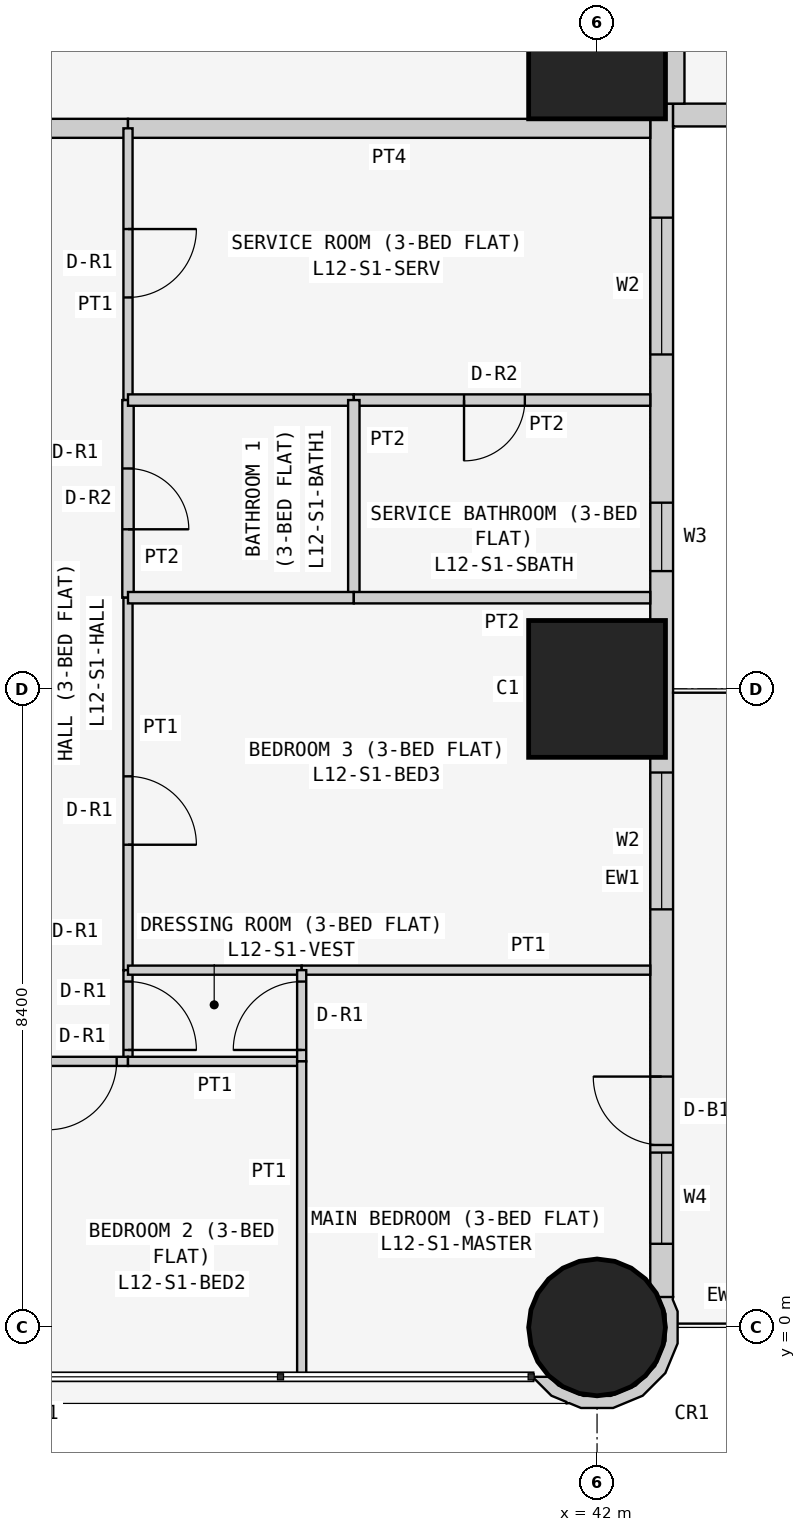
"""IFC4 building model, lengths in metres.
Left out: names, types, materials, properties, quantities, classifications, styles, units other than length and angle.
Written with IfcOpenShell. Run it as: python <this file> out.ifc"""

import sys

from ifc_helpers import new_model, si_unit, direction, frame, frame_2d, origin, origin_2d, place, context, subcontext, project, spatial, polyline, rectangle, circle, outline, extrude, element, fill, save


model = new_model("IFC4")
c1 = context("Model", 3, precision=1e-05, world=origin(), true_north=direction((0.0, 1.0)))
c2 = subcontext(c1, "Body", "Model", "MODEL_VIEW")
j1 = project(units=[si_unit("LENGTHUNIT", "METRE"), si_unit("PLANEANGLEUNIT", "RADIAN")], contexts=[c1])
p1 = place(None, origin())
s1 = spatial("IfcSite", under=j1, at=p1, CompositionType="ELEMENT")
p2 = place(p1, origin())
s2 = spatial("IfcBuilding", under=s1, at=p2, CompositionType="ELEMENT")
p3 = place(p2, frame((0.0, 0.0, 52.5)))
s3 = spatial("IfcBuildingStorey", under=s2, at=p3, CompositionType="ELEMENT", Elevation=52.5)
p4 = place(p3, frame((42.0, 0.0, 0.0), z_axis=(0.0, 0.0, 1.0), x_axis=(1.0, 0.0, 0.0)))
e1 = element("IfcColumn", 1, at=p4, inside=s3, PredefinedType="COLUMN", context=c2, shape_type="SweptSolid", body=[
    extrude(circle(Radius=0.9, at=origin_2d()), origin(), (0.0, 0.0, 1.0), 3.6),
])
for number, where, z_axis, x_axis in (
    (2, (42.0, 8.4, 0.0), (0.0, 0.0, 1.0), (1.0, 0.0, 0.0)),
    (3, (42.0, 16.8, 0.0), (0.0, 0.0, 1.0), (1.0, 0.0, 0.0)),
):
    element("IfcColumn", number, at=place(p3, frame(where, z_axis=z_axis, x_axis=x_axis)), inside=s3, PredefinedType="COLUMN", context=c2, shape_type="SweptSolid", body=[
        extrude(rectangle(XDim=1.8, YDim=1.8, at=origin_2d()), origin(), (0.0, 0.0, 1.0), 3.6),
    ])
p5 = place(p3, frame((42.85, 0.4, 0.0), z_axis=(0.0, 0.0, 1.0), x_axis=(0.0, 1.0, 0.0)))
e4 = element("IfcWall", 4, at=p5, inside=s3, PredefinedType="SOLIDWALL", context=c2, shape_type="SweptSolid", body=[
    extrude(rectangle(XDim=15.7, YDim=0.3, at=frame_2d((7.85, 0.0))), origin(), (0.0, 0.0, 1.0), 3.45),
])
p6 = place(p5, frame((12.4, 0.0, 0.9)))
e5 = element("IfcOpeningElement", 5, at=p6, cuts=e4, PredefinedType="OPENING", context=c2, shape_type="SweptSolid", body=[
    extrude(rectangle(XDim=1.8, YDim=1.5, at=frame_2d((0.9, 0.75))), frame((0.0, 0.16, 0.0), z_axis=(0.0, -1.0, 0.0), x_axis=(1.0, 0.0, 0.0)), (0.0, 0.0, 1.0), 0.32),
])
p7 = place(p5, frame((9.55, 0.0, 1.5)))
e6 = element("IfcOpeningElement", 6, at=p7, cuts=e4, PredefinedType="OPENING", context=c2, shape_type="SweptSolid", body=[
    extrude(rectangle(XDim=0.9, YDim=0.7, at=frame_2d((0.45, 0.35))), frame((0.0, 0.16, 0.0), z_axis=(0.0, -1.0, 0.0), x_axis=(1.0, 0.0, 0.0)), (0.0, 0.0, 1.0), 0.32),
])
p8 = place(p5, frame((5.1, 0.0, 0.9)))
e7 = element("IfcOpeningElement", 7, at=p8, cuts=e4, PredefinedType="OPENING", context=c2, shape_type="SweptSolid", body=[
    extrude(rectangle(XDim=1.8, YDim=1.5, at=frame_2d((0.9, 0.75))), frame((0.0, 0.16, 0.0), z_axis=(0.0, -1.0, 0.0), x_axis=(1.0, 0.0, 0.0)), (0.0, 0.0, 1.0), 0.32),
])
p9 = place(p5, frame((2.0, 0.0, 0.0)))
e8 = element("IfcOpeningElement", 8, at=p9, cuts=e4, PredefinedType="OPENING", context=c2, shape_type="SweptSolid", body=[
    extrude(rectangle(XDim=0.9, YDim=2.4, at=frame_2d((0.45, 1.2))), frame((0.0, 0.16, 0.0), z_axis=(0.0, -1.0, 0.0), x_axis=(1.0, 0.0, 0.0)), (0.0, 0.0, 1.0), 0.32),
])
p10 = place(p5, frame((0.7, 0.0, 0.9)))
e9 = element("IfcOpeningElement", 9, at=p10, cuts=e4, PredefinedType="OPENING", context=c2, shape_type="SweptSolid", body=[
    extrude(rectangle(XDim=1.2, YDim=1.5, at=frame_2d((0.6, 0.75))), frame((0.0, 0.16, 0.0), z_axis=(0.0, -1.0, 0.0), x_axis=(1.0, 0.0, 0.0)), (0.0, 0.0, 1.0), 0.32),
])
p11 = place(p3, frame((43.0, 15.95, 0.0), z_axis=(0.0, 0.0, 1.0), x_axis=(1.0, 0.0, 0.0)))
e10 = element("IfcWall", 10, at=p11, inside=s3, PredefinedType="SOLIDWALL", context=c2, shape_type="SweptSolid", body=[
    extrude(rectangle(XDim=15.4, YDim=0.3, at=frame_2d((7.7, 0.0))), origin(), (0.0, 0.0, 1.0), 3.45),
])
p12 = place(p11, frame((1.2, 0.0, 0.9)))
e11 = element("IfcOpeningElement", 11, at=p12, cuts=e10, PredefinedType="OPENING", context=c2, shape_type="SweptSolid", body=[
    extrude(rectangle(XDim=1.8, YDim=1.5, at=frame_2d((0.9, 0.75))), frame((0.0, 0.16, 0.0), z_axis=(0.0, -1.0, 0.0), x_axis=(1.0, 0.0, 0.0)), (0.0, 0.0, 1.0), 0.32),
])
p13 = place(p11, frame((4.95, 0.0, 1.5)))
e12 = element("IfcOpeningElement", 12, at=p13, cuts=e10, PredefinedType="OPENING", context=c2, shape_type="SweptSolid", body=[
    extrude(rectangle(XDim=0.9, YDim=0.7, at=frame_2d((0.45, 0.35))), frame((0.0, 0.16, 0.0), z_axis=(0.0, -1.0, 0.0), x_axis=(1.0, 0.0, 0.0)), (0.0, 0.0, 1.0), 0.32),
])
p14 = place(p11, frame((8.5, 0.0, 0.9)))
e13 = element("IfcOpeningElement", 13, at=p14, cuts=e10, PredefinedType="OPENING", context=c2, shape_type="SweptSolid", body=[
    extrude(rectangle(XDim=1.8, YDim=1.5, at=frame_2d((0.9, 0.75))), frame((0.0, 0.16, 0.0), z_axis=(0.0, -1.0, 0.0), x_axis=(1.0, 0.0, 0.0)), (0.0, 0.0, 1.0), 0.32),
])
p15 = place(p11, frame((12.5, 0.0, 0.0)))
e14 = element("IfcOpeningElement", 14, at=p15, cuts=e10, PredefinedType="OPENING", context=c2, shape_type="SweptSolid", body=[
    extrude(rectangle(XDim=0.9, YDim=2.4, at=frame_2d((0.45, 1.2))), frame((0.0, 0.16, 0.0), z_axis=(0.0, -1.0, 0.0), x_axis=(1.0, 0.0, 0.0)), (0.0, 0.0, 1.0), 0.32),
])
p16 = place(p11, frame((13.5, 0.0, 0.9)))
e15 = element("IfcOpeningElement", 15, at=p16, cuts=e10, PredefinedType="OPENING", context=c2, shape_type="SweptSolid", body=[
    extrude(rectangle(XDim=1.2, YDim=1.5, at=frame_2d((0.6, 0.75))), frame((0.0, 0.16, 0.0), z_axis=(0.0, -1.0, 0.0), x_axis=(1.0, 0.0, 0.0)), (0.0, 0.0, 1.0), 0.32),
])
p17 = place(p3, frame((41.233, -0.611, 0.0), z_axis=(0.0, 0.0, 1.0), x_axis=(0.377204953059, -0.926129809145, 0.0)))
e16 = element("IfcWall", 16, at=p17, inside=s3, PredefinedType="SOLIDWALL", context=c2, shape_type="SweptSolid", body=[
    extrude(outline(polyline([(0.319, 1.843), (-0.072, 2.001), (-0.24, 2.001), (-0.269, 2.017), (-0.37, 1.841), (-0.102, 1.842), (0.23, 1.707), (0.485, 1.455), (0.624, 1.125), (0.626, 0.766), (0.49, 0.434), (0.239, 0.179), (0.09, 0.117), (0.011, -0.078), (0.024, -0.083), (0.33, 0.045), (0.48, 0.197), (0.499, 0.193), (0.508, 0.225), (0.626, 0.345), (0.785, 0.736), (0.782, 1.157), (0.619, 1.546), (0.319, 1.843)])), origin(), (0.0, 0.0, 1.0), 3.45),
])
p18 = place(p3, frame((43.025, 22.571, 0.0), z_axis=(0.0, 0.0, 1.0), x_axis=(0.0, -1.0, 0.0)))
e17 = element("IfcWall", 17, at=p18, inside=s3, PredefinedType="PARTITIONING", context=c2, shape_type="SweptSolid", body=[
    extrude(rectangle(XDim=6.471, YDim=0.25, at=frame_2d((3.235, 0.0))), origin(), (0.0, 0.0, 1.0), 3.45),
])
p19 = place(p3, frame((35.829, 15.775, 0.0), z_axis=(0.0, 0.0, 1.0), x_axis=(-1.0, 0.0, 0.0)))
e18 = element("IfcWall", 18, at=p19, inside=s3, PredefinedType="PARTITIONING", context=c2, shape_type="SweptSolid", body=[
    extrude(rectangle(XDim=1.2, YDim=0.25, at=frame_2d((0.6, 0.0))), origin(), (0.0, 0.0, 1.0), 3.45),
])
p20 = place(p3, frame((42.7, 15.775, 0.0), z_axis=(0.0, 0.0, 1.0), x_axis=(-1.0, 0.0, 0.0)))
e19 = element("IfcWall", 19, at=p20, inside=s3, PredefinedType="PARTITIONING", context=c2, shape_type="SweptSolid", body=[
    extrude(rectangle(XDim=6.871, YDim=0.25, at=frame_2d((3.436, 0.0))), origin(), (0.0, 0.0, 1.0), 3.45),
])
p21 = place(p3, frame((35.829, 12.2, 0.0), z_axis=(0.0, 0.0, 1.0), x_axis=(0.0, 1.0, 0.0)))
e20 = element("IfcWall", 20, at=p21, inside=s3, PredefinedType="PARTITIONING", context=c2, shape_type="SweptSolid", body=[
    extrude(rectangle(XDim=3.575, YDim=0.12, at=frame_2d((1.788, 0.0))), origin(), (0.0, 0.0, 1.0), 3.45),
])
p22 = place(p21, frame((1.35, 0.0, 0.0)))
e21 = element("IfcOpeningElement", 21, at=p22, cuts=e20, PredefinedType="OPENING", context=c2, shape_type="SweptSolid", body=[
    extrude(rectangle(XDim=0.9, YDim=2.1, at=frame_2d((0.45, 1.05))), frame((0.0, 0.07, 0.0), z_axis=(0.0, -1.0, 0.0), x_axis=(1.0, 0.0, 0.0)), (0.0, 0.0, 1.0), 0.14),
])
p23 = place(p3, frame((35.829, 9.6, 0.0), z_axis=(0.0, 0.0, 1.0), x_axis=(0.0, 1.0, 0.0)))
e22 = element("IfcWall", 22, at=p23, inside=s3, PredefinedType="PARTITIONING", context=c2, shape_type="SweptSolid", body=[
    extrude(rectangle(XDim=2.6, YDim=0.15, at=frame_2d((1.3, 0.0))), origin(), (0.0, 0.0, 1.0), 3.45),
])
p24 = place(p23, frame((0.9, 0.0, 0.0)))
e23 = element("IfcOpeningElement", 23, at=p24, cuts=e22, PredefinedType="OPENING", context=c2, shape_type="SweptSolid", body=[
    extrude(rectangle(XDim=0.8, YDim=2.1, at=frame_2d((0.4, 1.05))), frame((0.0, 0.085, 0.0), z_axis=(0.0, -1.0, 0.0), x_axis=(1.0, 0.0, 0.0)), (0.0, 0.0, 1.0), 0.17),
])
p25 = place(p3, frame((35.829, 4.7, 0.0), z_axis=(0.0, 0.0, 1.0), x_axis=(0.0, 1.0, 0.0)))
e24 = element("IfcWall", 24, at=p25, inside=s3, PredefinedType="PARTITIONING", context=c2, shape_type="SweptSolid", body=[
    extrude(rectangle(XDim=4.9, YDim=0.12, at=frame_2d((2.45, 0.0))), origin(), (0.0, 0.0, 1.0), 3.45),
])
p26 = place(p25, frame((1.65, 0.0, 0.0)))
e25 = element("IfcOpeningElement", 25, at=p26, cuts=e24, PredefinedType="OPENING", context=c2, shape_type="SweptSolid", body=[
    extrude(rectangle(XDim=0.9, YDim=2.1, at=frame_2d((0.45, 1.05))), frame((0.0, 0.07, 0.0), z_axis=(0.0, -1.0, 0.0), x_axis=(1.0, 0.0, 0.0)), (0.0, 0.0, 1.0), 0.14),
])
p27 = place(p3, frame((35.829, 3.5, 0.0), z_axis=(0.0, 0.0, 1.0), x_axis=(0.0, 1.0, 0.0)))
e26 = element("IfcWall", 26, at=p27, inside=s3, PredefinedType="PARTITIONING", context=c2, shape_type="SweptSolid", body=[
    extrude(rectangle(XDim=1.2, YDim=0.12, at=frame_2d((0.6, 0.0))), origin(), (0.0, 0.0, 1.0), 3.45),
])
p28 = place(p27, frame((0.15, 0.0, 0.0)))
e27 = element("IfcOpeningElement", 27, at=p28, cuts=e26, PredefinedType="OPENING", context=c2, shape_type="SweptSolid", body=[
    extrude(rectangle(XDim=0.9, YDim=2.1, at=frame_2d((0.45, 1.05))), frame((0.0, 0.07, 0.0), z_axis=(0.0, -1.0, 0.0), x_axis=(1.0, 0.0, 0.0)), (0.0, 0.0, 1.0), 0.14),
])
p29 = place(p3, frame((34.629, 3.5, 0.0), z_axis=(0.0, 0.0, 1.0), x_axis=(1.0, 0.0, 0.0)))
e28 = element("IfcWall", 28, at=p29, inside=s3, PredefinedType="PARTITIONING", context=c2, shape_type="SweptSolid", body=[
    extrude(rectangle(XDim=1.2, YDim=0.12, at=frame_2d((0.6, 0.0))), origin(), (0.0, 0.0, 1.0), 3.45),
])
p30 = place(p29, frame((0.151, 0.0, 0.0)))
e29 = element("IfcOpeningElement", 29, at=p30, cuts=e28, PredefinedType="OPENING", context=c2, shape_type="SweptSolid", body=[
    extrude(rectangle(XDim=0.9, YDim=2.1, at=frame_2d((0.45, 1.05))), frame((0.0, 0.07, 0.0), z_axis=(0.0, -1.0, 0.0), x_axis=(1.0, 0.0, 0.0)), (0.0, 0.0, 1.0), 0.14),
])
p31 = place(p3, frame((35.829, 12.2, 0.0), z_axis=(0.0, 0.0, 1.0), x_axis=(1.0, 0.0, 0.0)))
e30 = element("IfcWall", 30, at=p31, inside=s3, PredefinedType="PARTITIONING", context=c2, shape_type="SweptSolid", body=[
    extrude(rectangle(XDim=2.971, YDim=0.15, at=frame_2d((1.485, 0.0))), origin(), (0.0, 0.0, 1.0), 3.45),
])
p32 = place(p3, frame((38.8, 12.2, 0.0), z_axis=(0.0, 0.0, 1.0), x_axis=(1.0, 0.0, 0.0)))
e31 = element("IfcWall", 31, at=p32, inside=s3, PredefinedType="PARTITIONING", context=c2, shape_type="SweptSolid", body=[
    extrude(rectangle(XDim=3.9, YDim=0.15, at=frame_2d((1.95, 0.0))), origin(), (0.0, 0.0, 1.0), 3.45),
])
p33 = place(p32, frame((1.45, 0.0, 0.0)))
e32 = element("IfcOpeningElement", 32, at=p33, cuts=e31, PredefinedType="OPENING", context=c2, shape_type="SweptSolid", body=[
    extrude(rectangle(XDim=0.8, YDim=2.1, at=frame_2d((0.4, 1.05))), frame((0.0, 0.085, 0.0), z_axis=(0.0, -1.0, 0.0), x_axis=(1.0, 0.0, 0.0)), (0.0, 0.0, 1.0), 0.17),
])
p34 = place(p3, frame((38.8, 9.6, 0.0), z_axis=(0.0, 0.0, 1.0), x_axis=(0.0, 1.0, 0.0)))
e33 = element("IfcWall", 33, at=p34, inside=s3, PredefinedType="PARTITIONING", context=c2, shape_type="SweptSolid", body=[
    extrude(rectangle(XDim=2.6, YDim=0.15, at=frame_2d((1.3, 0.0))), origin(), (0.0, 0.0, 1.0), 3.45),
])
p35 = place(p3, frame((35.829, 9.6, 0.0), z_axis=(0.0, 0.0, 1.0), x_axis=(1.0, 0.0, 0.0)))
e34 = element("IfcWall", 34, at=p35, inside=s3, PredefinedType="PARTITIONING", context=c2, shape_type="SweptSolid", body=[
    extrude(rectangle(XDim=2.971, YDim=0.15, at=frame_2d((1.485, 0.0))), origin(), (0.0, 0.0, 1.0), 3.45),
])
p36 = place(p3, frame((38.8, 9.6, 0.0), z_axis=(0.0, 0.0, 1.0), x_axis=(1.0, 0.0, 0.0)))
e35 = element("IfcWall", 35, at=p36, inside=s3, PredefinedType="PARTITIONING", context=c2, shape_type="SweptSolid", body=[
    extrude(rectangle(XDim=3.9, YDim=0.15, at=frame_2d((1.95, 0.0))), origin(), (0.0, 0.0, 1.0), 3.45),
])
p37 = place(p3, frame((35.829, 4.7, 0.0), z_axis=(0.0, 0.0, 1.0), x_axis=(1.0, 0.0, 0.0)))
e36 = element("IfcWall", 36, at=p37, inside=s3, PredefinedType="PARTITIONING", context=c2, shape_type="SweptSolid", body=[
    extrude(rectangle(XDim=2.285, YDim=0.12, at=frame_2d((1.143, 0.0))), origin(), (0.0, 0.0, 1.0), 3.45),
])
p38 = place(p3, frame((38.114, 4.7, 0.0), z_axis=(0.0, 0.0, 1.0), x_axis=(1.0, 0.0, 0.0)))
e37 = element("IfcWall", 37, at=p38, inside=s3, PredefinedType="PARTITIONING", context=c2, shape_type="SweptSolid", body=[
    extrude(rectangle(XDim=4.586, YDim=0.12, at=frame_2d((2.293, 0.0))), origin(), (0.0, 0.0, 1.0), 3.45),
])
p39 = place(p3, frame((35.829, 3.5, 0.0), z_axis=(0.0, 0.0, 1.0), x_axis=(1.0, 0.0, 0.0)))
e38 = element("IfcWall", 38, at=p39, inside=s3, PredefinedType="PARTITIONING", context=c2, shape_type="SweptSolid", body=[
    extrude(rectangle(XDim=2.285, YDim=0.12, at=frame_2d((1.143, 0.0))), origin(), (0.0, 0.0, 1.0), 3.45),
])
p40 = place(p3, frame((38.114, 3.5, 0.0), z_axis=(0.0, 0.0, 1.0), x_axis=(0.0, 1.0, 0.0)))
e39 = element("IfcWall", 39, at=p40, inside=s3, PredefinedType="PARTITIONING", context=c2, shape_type="SweptSolid", body=[
    extrude(rectangle(XDim=1.2, YDim=0.12, at=frame_2d((0.6, 0.0))), origin(), (0.0, 0.0, 1.0), 3.45),
])
p41 = place(p40, frame((0.15, 0.0, 0.0)))
e40 = element("IfcOpeningElement", 40, at=p41, cuts=e39, PredefinedType="OPENING", context=c2, shape_type="SweptSolid", body=[
    extrude(rectangle(XDim=0.9, YDim=2.1, at=frame_2d((0.45, 1.05))), frame((0.0, 0.07, 0.0), z_axis=(0.0, -1.0, 0.0), x_axis=(1.0, 0.0, 0.0)), (0.0, 0.0, 1.0), 0.14),
])
p42 = place(p3, frame((38.114, -0.65, 0.0), z_axis=(0.0, 0.0, 1.0), x_axis=(0.0, 1.0, 0.0)))
e41 = element("IfcWall", 41, at=p42, inside=s3, PredefinedType="PARTITIONING", context=c2, shape_type="SweptSolid", body=[
    extrude(rectangle(XDim=4.15, YDim=0.12, at=frame_2d((2.075, 0.0))), origin(), (0.0, 0.0, 1.0), 3.45),
])
p43 = place(p6, origin())
e42 = element("IfcWindow", 42, at=p43, inside=s3, PartitioningType="SINGLE_PANEL", PredefinedType="WINDOW", context=c2, shape_type="SweptSolid", body=[
    extrude(rectangle(XDim=1.8, YDim=1.5, at=frame_2d((0.9, 0.75))), frame((0.0, 0.03, 0.0), z_axis=(0.0, -1.0, 0.0), x_axis=(1.0, 0.0, 0.0)), (0.0, 0.0, 1.0), 0.06),
])
fill(e5, e42)
p44 = place(p7, origin())
e43 = element("IfcWindow", 43, at=p44, inside=s3, PartitioningType="SINGLE_PANEL", PredefinedType="WINDOW", context=c2, shape_type="SweptSolid", body=[
    extrude(rectangle(XDim=0.9, YDim=0.7, at=frame_2d((0.45, 0.35))), frame((0.0, 0.03, 0.0), z_axis=(0.0, -1.0, 0.0), x_axis=(1.0, 0.0, 0.0)), (0.0, 0.0, 1.0), 0.06),
])
fill(e6, e43)
p45 = place(p8, origin())
e44 = element("IfcWindow", 44, at=p45, inside=s3, PartitioningType="SINGLE_PANEL", PredefinedType="WINDOW", context=c2, shape_type="SweptSolid", body=[
    extrude(rectangle(XDim=1.8, YDim=1.5, at=frame_2d((0.9, 0.75))), frame((0.0, 0.03, 0.0), z_axis=(0.0, -1.0, 0.0), x_axis=(1.0, 0.0, 0.0)), (0.0, 0.0, 1.0), 0.06),
])
fill(e7, e44)
p46 = place(p9, origin())
e45 = element("IfcDoor", 45, at=p46, inside=s3, OperationType="SINGLE_SWING_RIGHT", PredefinedType="DOOR", context=c2, shape_type="SweptSolid", body=[
    extrude(rectangle(XDim=0.9, YDim=2.4, at=frame_2d((0.45, 1.2))), frame((0.0, 0.025, 0.0), z_axis=(0.0, -1.0, 0.0), x_axis=(1.0, 0.0, 0.0)), (0.0, 0.0, 1.0), 0.05),
])
fill(e8, e45)
p47 = place(p10, origin())
e46 = element("IfcWindow", 46, at=p47, inside=s3, PartitioningType="SINGLE_PANEL", PredefinedType="WINDOW", context=c2, shape_type="SweptSolid", body=[
    extrude(rectangle(XDim=1.2, YDim=1.5, at=frame_2d((0.6, 0.75))), frame((0.0, 0.03, 0.0), z_axis=(0.0, -1.0, 0.0), x_axis=(1.0, 0.0, 0.0)), (0.0, 0.0, 1.0), 0.06),
])
fill(e9, e46)
p48 = place(p22, frame((0.9, 0.0, 0.0), z_axis=(0.0, 0.0, 1.0), x_axis=(-1.0, 0.0, 0.0)))
e47 = element("IfcDoor", 47, at=p48, inside=s3, OperationType="SINGLE_SWING_LEFT", PredefinedType="DOOR", context=c2, shape_type="SweptSolid", body=[
    extrude(rectangle(XDim=0.9, YDim=2.1, at=frame_2d((0.45, 1.05))), frame((0.0, 0.025, 0.0), z_axis=(0.0, -1.0, 0.0), x_axis=(1.0, 0.0, 0.0)), (0.0, 0.0, 1.0), 0.05),
])
fill(e21, e47)
p49 = place(p33, frame((0.8, 0.0, 0.0), z_axis=(0.0, 0.0, 1.0), x_axis=(-1.0, 0.0, 0.0)))
e48 = element("IfcDoor", 48, at=p49, inside=s3, OperationType="SINGLE_SWING_RIGHT", PredefinedType="DOOR", context=c2, shape_type="SweptSolid", body=[
    extrude(rectangle(XDim=0.8, YDim=2.1, at=frame_2d((0.4, 1.05))), frame((0.0, 0.025, 0.0), z_axis=(0.0, -1.0, 0.0), x_axis=(1.0, 0.0, 0.0)), (0.0, 0.0, 1.0), 0.05),
])
fill(e32, e48)
p50 = place(p24, frame((0.8, 0.0, 0.0), z_axis=(0.0, 0.0, 1.0), x_axis=(-1.0, 0.0, 0.0)))
e49 = element("IfcDoor", 49, at=p50, inside=s3, OperationType="SINGLE_SWING_RIGHT", PredefinedType="DOOR", context=c2, shape_type="SweptSolid", body=[
    extrude(rectangle(XDim=0.8, YDim=2.1, at=frame_2d((0.4, 1.05))), frame((0.0, 0.025, 0.0), z_axis=(0.0, -1.0, 0.0), x_axis=(1.0, 0.0, 0.0)), (0.0, 0.0, 1.0), 0.05),
])
fill(e23, e49)
p51 = place(p26, frame((0.9, 0.0, 0.0), z_axis=(0.0, 0.0, 1.0), x_axis=(-1.0, 0.0, 0.0)))
e50 = element("IfcDoor", 50, at=p51, inside=s3, OperationType="SINGLE_SWING_RIGHT", PredefinedType="DOOR", context=c2, shape_type="SweptSolid", body=[
    extrude(rectangle(XDim=0.9, YDim=2.1, at=frame_2d((0.45, 1.05))), frame((0.0, 0.025, 0.0), z_axis=(0.0, -1.0, 0.0), x_axis=(1.0, 0.0, 0.0)), (0.0, 0.0, 1.0), 0.05),
])
fill(e25, e50)
p52 = place(p28, frame((0.9, 0.0, 0.0), z_axis=(0.0, 0.0, 1.0), x_axis=(-1.0, 0.0, 0.0)))
e51 = element("IfcDoor", 51, at=p52, inside=s3, OperationType="SINGLE_SWING_RIGHT", PredefinedType="DOOR", context=c2, shape_type="SweptSolid", body=[
    extrude(rectangle(XDim=0.9, YDim=2.1, at=frame_2d((0.45, 1.05))), frame((0.0, 0.025, 0.0), z_axis=(0.0, -1.0, 0.0), x_axis=(1.0, 0.0, 0.0)), (0.0, 0.0, 1.0), 0.05),
])
fill(e27, e51)
p53 = place(p41, origin())
e52 = element("IfcDoor", 52, at=p53, inside=s3, OperationType="SINGLE_SWING_LEFT", PredefinedType="DOOR", context=c2, shape_type="SweptSolid", body=[
    extrude(rectangle(XDim=0.9, YDim=2.1, at=frame_2d((0.45, 1.05))), frame((0.0, 0.025, 0.0), z_axis=(0.0, -1.0, 0.0), x_axis=(1.0, 0.0, 0.0)), (0.0, 0.0, 1.0), 0.05),
])
fill(e40, e52)
p54 = place(p30, frame((0.9, 0.0, 0.0), z_axis=(0.0, 0.0, 1.0), x_axis=(-1.0, 0.0, 0.0)))
e53 = element("IfcDoor", 53, at=p54, inside=s3, OperationType="SINGLE_SWING_RIGHT", PredefinedType="DOOR", context=c2, shape_type="SweptSolid", body=[
    extrude(rectangle(XDim=0.9, YDim=2.1, at=frame_2d((0.45, 1.05))), frame((0.0, 0.025, 0.0), z_axis=(0.0, -1.0, 0.0), x_axis=(1.0, 0.0, 0.0)), (0.0, 0.0, 1.0), 0.05),
])
fill(e29, e53)
save(model, sys.argv[1])
